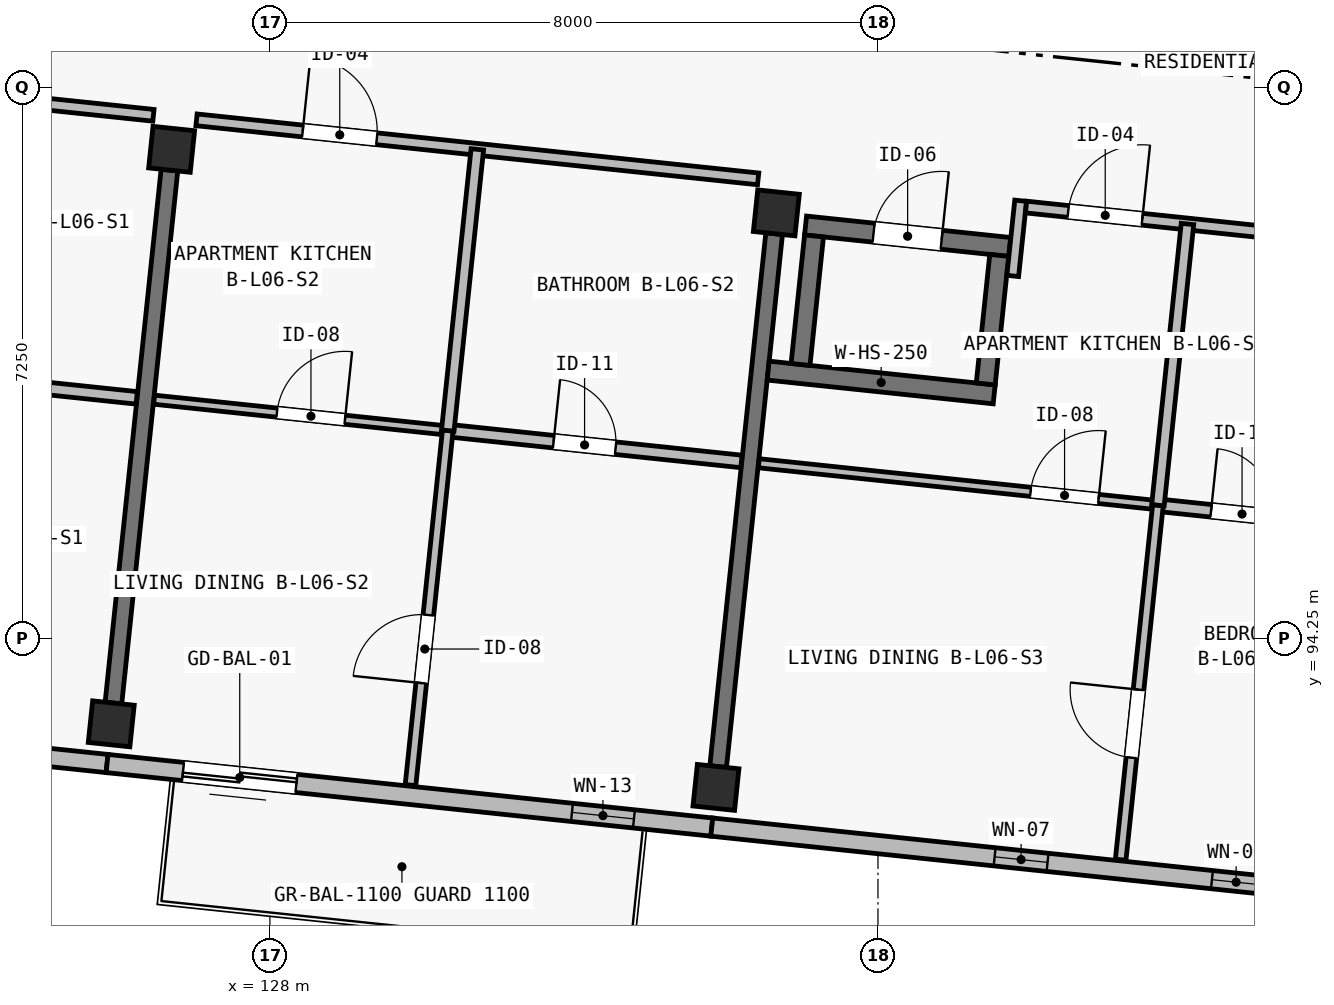
"""IFC4 building model, lengths in metres.
Left out: names, types, materials, properties, quantities, classifications, styles, units other than length and angle.
Written with IfcOpenShell. Run it as: python <this file> out.ifc"""

import sys

from ifc_helpers import new_model, si_unit, direction, frame, frame_2d, origin, origin_2d, place, context, subcontext, project, spatial, rectangle, extrude, element, fill, save


model = new_model("IFC4")
c1 = context("Model", 3, precision=1e-05, world=origin(), true_north=direction((0.0, 1.0)))
c2 = subcontext(c1, "Body", "Model", "MODEL_VIEW")
j1 = project(units=[si_unit("LENGTHUNIT", "METRE"), si_unit("PLANEANGLEUNIT", "RADIAN")], contexts=[c1])
p1 = place(None, origin())
s1 = spatial("IfcSite", under=j1, at=p1, CompositionType="ELEMENT")
p2 = place(p1, origin())
s2 = spatial("IfcBuilding", under=s1, at=p2, CompositionType="ELEMENT")
p3 = place(p2, frame((0.0, 0.0, 21.4)))
s3 = spatial("IfcBuildingStorey", under=s2, at=p3, CompositionType="ELEMENT", Elevation=21.4)
for number, where, z_axis, x_axis in (
    (1, (125.912, 93.127, 0.0), (0.0, 0.0, 1.0), (0.995, -0.105, 0.0)),
    (2, (126.707, 100.686, 0.0), (0.0, 0.0, 1.0), (0.995, -0.105, 0.0)),
    (3, (133.868, 92.291, 0.0), (0.0, 0.0, 1.0), (0.995, -0.105, 0.0)),
    (4, (134.663, 99.85, 0.0), (0.0, 0.0, 1.0), (0.995, -0.105, 0.0)),
):
    element("IfcColumn", number, at=place(p3, frame(where, z_axis=z_axis, x_axis=x_axis)), inside=s3, PredefinedType="COLUMN", context=c2, shape_type="SweptSolid", body=[
        extrude(rectangle(XDim=0.55, YDim=0.55, at=origin_2d()), origin(), (0.0, 0.0, 1.0), 3.25),
    ])
p4 = place(p3, frame((125.941, 93.401, 0.0), z_axis=(0.0, 0.0, 1.0), x_axis=(0.104515329964, 0.994523275646, 0.0)))
e5 = element("IfcWall", 5, at=p4, inside=s3, PredefinedType="SHEAR", context=c2, shape_type="SweptSolid", body=[
    extrude(rectangle(XDim=7.05, YDim=0.22, at=frame_2d((3.525, 0.0))), origin(), (0.0, 0.0, 1.0), 2.5),
])
p5 = place(p3, frame((133.897, 92.565, 0.0), z_axis=(0.0, 0.0, 1.0), x_axis=(0.104545981508, 0.994520053971, 0.0)))
e6 = element("IfcWall", 6, at=p5, inside=s3, PredefinedType="SHEAR", context=c2, shape_type="SweptSolid", body=[
    extrude(rectangle(XDim=7.05, YDim=0.22, at=frame_2d((3.525, 0.0))), origin(), (0.0, 0.0, 1.0), 2.5),
])
p6 = place(p3, frame((134.555, 97.775, 0.0), z_axis=(0.0, 0.0, 1.0), x_axis=(0.994514844427, -0.104595526741, 0.0)))
e7 = element("IfcWall", 7, at=p6, inside=s3, PredefinedType="SHEAR", context=c2, shape_type="SweptSolid", body=[
    extrude(rectangle(XDim=2.99, YDim=0.25, at=frame_2d((1.495, 0.0))), origin(), (0.0, 0.0, 1.0), 3.25),
])
p7 = place(p3, frame((135.048, 99.684, 0.0), z_axis=(0.0, 0.0, 1.0), x_axis=(0.994522285292, -0.104524753323, 0.0)))
e8 = element("IfcWall", 8, at=p7, inside=s3, PredefinedType="SHEAR", context=c2, shape_type="SweptSolid", body=[
    extrude(rectangle(XDim=2.7, YDim=0.25, at=frame_2d((1.35, 0.0))), origin(), (0.0, 0.0, 1.0), 3.25),
])
p8 = place(p7, frame((0.9, 0.0, 0.0)))
e9 = element("IfcOpeningElement", 9, at=p8, cuts=e8, PredefinedType="OPENING", context=c2, shape_type="SweptSolid", body=[
    extrude(rectangle(XDim=0.9, YDim=2.05, at=frame_2d((0.45, 1.025))), frame((0.0, 0.14, 0.0), z_axis=(0.0, -1.0, 0.0), x_axis=(1.0, 0.0, 0.0)), (0.0, 0.0, 1.0), 0.28),
])
for number, where, z_axis, x_axis in (
    (10, (134.981, 97.855, 0.0), (0.0, 0.0, 1.0), (0.105, 0.995, 0.0)),
    (11, (137.418, 97.599, 0.0), (0.0, 0.0, 1.0), (0.105, 0.995, 0.0)),
):
    element("IfcWall", number, at=place(p3, frame(where, z_axis=z_axis, x_axis=x_axis)), inside=s3, PredefinedType="SHEAR", context=c2, shape_type="SweptSolid", body=[
        extrude(rectangle(XDim=1.7, YDim=0.25, at=frame_2d((0.85, 0.0))), origin(), (0.0, 0.0, 1.0), 3.25),
    ])
p9 = place(p3, frame((125.857, 92.605, 0.0), z_axis=(0.0, 0.0, 1.0), x_axis=(-0.994522329422, 0.104524333444, 0.0)))
e12 = element("IfcWall", 12, at=p9, inside=s3, PredefinedType="SOLIDWALL", context=c2, shape_type="SweptSolid", body=[
    extrude(rectangle(XDim=8.0, YDim=0.24, at=frame_2d((4.0, 0.0))), origin(), (0.0, 0.0, 1.0), 3.0),
])
p10 = place(p9, frame((1.919, 0.0, 0.48)))
e13 = element("IfcOpeningElement", 13, at=p10, cuts=e12, PredefinedType="OPENING", context=c2, shape_type="SweptSolid", body=[
    extrude(rectangle(XDim=0.74, YDim=2.26, at=frame_2d((0.37, 1.13))), frame((0.0, 0.135, 0.0), z_axis=(0.0, -1.0, 0.0), x_axis=(1.0, 0.0, 0.0)), (0.0, 0.0, 1.0), 0.27),
])
p11 = place(p9, frame((5.33, 0.0, 0.48)))
e14 = element("IfcOpeningElement", 14, at=p11, cuts=e12, PredefinedType="OPENING", context=c2, shape_type="SweptSolid", body=[
    extrude(rectangle(XDim=0.8, YDim=2.3, at=frame_2d((0.4, 1.15))), frame((0.0, 0.135, 0.0), z_axis=(0.0, -1.0, 0.0), x_axis=(1.0, 0.0, 0.0)), (0.0, 0.0, 1.0), 0.27),
])
p12 = place(p3, frame((133.814, 91.769, 0.0), z_axis=(0.0, 0.0, 1.0), x_axis=(-0.994522662826, 0.104521161134, 0.0)))
e15 = element("IfcWall", 15, at=p12, inside=s3, PredefinedType="SOLIDWALL", context=c2, shape_type="SweptSolid", body=[
    extrude(rectangle(XDim=8.0, YDim=0.24, at=frame_2d((4.0, 0.0))), origin(), (0.0, 0.0, 1.0), 3.0),
])
p13 = place(p12, frame((5.495, 0.0, 0.0)))
e16 = element("IfcOpeningElement", 16, at=p13, cuts=e15, PredefinedType="OPENING", context=c2, shape_type="SweptSolid", body=[
    extrude(rectangle(XDim=1.5, YDim=2.12, at=frame_2d((0.75, 1.06))), frame((0.0, 0.135, 0.0), z_axis=(0.0, -1.0, 0.0), x_axis=(1.0, 0.0, 0.0)), (0.0, 0.0, 1.0), 0.27),
])
p14 = place(p12, frame((1.03, 0.0, 0.5)))
e17 = element("IfcOpeningElement", 17, at=p14, cuts=e15, PredefinedType="OPENING", context=c2, shape_type="SweptSolid", body=[
    extrude(rectangle(XDim=0.82, YDim=2.18, at=frame_2d((0.41, 1.09))), frame((0.0, 0.135, 0.0), z_axis=(0.0, -1.0, 0.0), x_axis=(1.0, 0.0, 0.0)), (0.0, 0.0, 1.0), 0.27),
])
p15 = place(p3, frame((141.77, 90.933, 0.0), z_axis=(0.0, 0.0, 1.0), x_axis=(-0.994519156568, 0.104554517933, 0.0)))
e18 = element("IfcWall", 18, at=p15, inside=s3, PredefinedType="SOLIDWALL", context=c2, shape_type="SweptSolid", body=[
    extrude(rectangle(XDim=8.0, YDim=0.24, at=frame_2d((4.0, 0.0))), origin(), (0.0, 0.0, 1.0), 3.0),
])
p16 = place(p15, frame((0.743, 0.0, 0.42)))
e19 = element("IfcOpeningElement", 19, at=p16, cuts=e18, PredefinedType="OPENING", context=c2, shape_type="SweptSolid", body=[
    extrude(rectangle(XDim=0.64, YDim=2.18, at=frame_2d((0.32, 1.09))), frame((0.0, 0.135, 0.0), z_axis=(0.0, -1.0, 0.0), x_axis=(1.0, 0.0, 0.0)), (0.0, 0.0, 1.0), 0.27),
])
p17 = place(p15, frame((3.558, 0.0, 0.42)))
e20 = element("IfcOpeningElement", 20, at=p17, cuts=e18, PredefinedType="OPENING", context=c2, shape_type="SweptSolid", body=[
    extrude(rectangle(XDim=0.7, YDim=2.36, at=frame_2d((0.35, 1.18))), frame((0.0, 0.135, 0.0), z_axis=(0.0, -1.0, 0.0), x_axis=(1.0, 0.0, 0.0)), (0.0, 0.0, 1.0), 0.27),
])
p18 = place(p3, frame((119.078, 101.91, 0.0), z_axis=(0.0, 0.0, 1.0), x_axis=(0.99451912784, -0.104554791185, 0.0)))
e21 = element("IfcWall", 21, at=p18, inside=s3, PredefinedType="PARTITIONING", context=c2, shape_type="SweptSolid", body=[
    extrude(rectangle(XDim=7.43, YDim=0.155, at=frame_2d((3.715, 0.0))), origin(), (0.0, 0.0, 1.0), 2.97),
])
p19 = place(p18, frame((1.405, 0.0, 0.0)))
e22 = element("IfcOpeningElement", 22, at=p19, cuts=e21, PredefinedType="OPENING", context=c2, shape_type="SweptSolid", body=[
    extrude(rectangle(XDim=1.02, YDim=2.2, at=frame_2d((0.51, 1.1))), frame((0.0, 0.093, 0.0), z_axis=(0.0, -1.0, 0.0), x_axis=(1.0, 0.0, 0.0)), (0.0, 0.0, 1.0), 0.185),
])
p20 = place(p3, frame((122.384, 97.822, 0.0), z_axis=(0.0, 0.0, 1.0), x_axis=(0.994524375082, -0.104504867671, 0.0)))
e23 = element("IfcWall", 23, at=p20, inside=s3, PredefinedType="PLUMBINGWALL", context=c2, shape_type="SweptSolid", body=[
    extrude(rectangle(XDim=3.885, YDim=0.165, at=frame_2d((1.942, 0.0))), origin(), (0.0, 0.0, 1.0), 2.97),
])
p21 = place(p20, frame((1.4, 0.0, 0.0)))
e24 = element("IfcOpeningElement", 24, at=p21, cuts=e23, PredefinedType="OPENING", context=c2, shape_type="SweptSolid", body=[
    extrude(rectangle(XDim=0.82, YDim=2.08, at=frame_2d((0.41, 1.04))), frame((0.0, 0.097, 0.0), z_axis=(0.0, -1.0, 0.0), x_axis=(1.0, 0.0, 0.0)), (0.0, 0.0, 1.0), 0.195),
])
p22 = place(p3, frame((127.034, 101.074, 0.0), z_axis=(0.0, 0.0, 1.0), x_axis=(0.994522184982, -0.104525707739, 0.0)))
e25 = element("IfcWall", 25, at=p22, inside=s3, PredefinedType="PARTITIONING", context=c2, shape_type="SweptSolid", body=[
    extrude(rectangle(XDim=7.43, YDim=0.155, at=frame_2d((3.715, 0.0))), origin(), (0.0, 0.0, 1.0), 2.97),
])
p23 = place(p22, frame((1.405, 0.0, 0.0)))
e26 = element("IfcOpeningElement", 26, at=p23, cuts=e25, PredefinedType="OPENING", context=c2, shape_type="SweptSolid", body=[
    extrude(rectangle(XDim=0.98, YDim=2.15, at=frame_2d((0.49, 1.075))), frame((0.0, 0.093, 0.0), z_axis=(0.0, -1.0, 0.0), x_axis=(1.0, 0.0, 0.0)), (0.0, 0.0, 1.0), 0.185),
])
p24 = place(p3, frame((126.476, 97.392, 0.0), z_axis=(0.0, 0.0, 1.0), x_axis=(0.994517841934, -0.104567021925, 0.0)))
e27 = element("IfcWall", 27, at=p24, inside=s3, PredefinedType="PARTITIONING", context=c2, shape_type="SweptSolid", body=[
    extrude(rectangle(XDim=3.885, YDim=0.12, at=frame_2d((1.942, 0.0))), origin(), (0.0, 0.0, 1.0), 2.97),
])
p25 = place(p24, frame((1.625, 0.0, 0.0)))
e28 = element("IfcOpeningElement", 28, at=p25, cuts=e27, PredefinedType="OPENING", context=c2, shape_type="SweptSolid", body=[
    extrude(rectangle(XDim=0.9, YDim=2.1, at=frame_2d((0.45, 1.05))), frame((0.0, 0.075, 0.0), z_axis=(0.0, -1.0, 0.0), x_axis=(1.0, 0.0, 0.0)), (0.0, 0.0, 1.0), 0.15),
])
p26 = place(p3, frame((130.34, 96.986, 0.0), z_axis=(0.0, 0.0, 1.0), x_axis=(0.994524375082, -0.104504867671, 0.0)))
e29 = element("IfcWall", 29, at=p26, inside=s3, PredefinedType="PLUMBINGWALL", context=c2, shape_type="SweptSolid", body=[
    extrude(rectangle(XDim=3.885, YDim=0.165, at=frame_2d((1.942, 0.0))), origin(), (0.0, 0.0, 1.0), 2.97),
])
p27 = place(p26, frame((1.4, 0.0, 0.0)))
e30 = element("IfcOpeningElement", 30, at=p27, cuts=e29, PredefinedType="OPENING", context=c2, shape_type="SweptSolid", body=[
    extrude(rectangle(XDim=0.82, YDim=2.08, at=frame_2d((0.41, 1.04))), frame((0.0, 0.097, 0.0), z_axis=(0.0, -1.0, 0.0), x_axis=(1.0, 0.0, 0.0)), (0.0, 0.0, 1.0), 0.195),
])
p28 = place(p3, frame((129.85, 92.322, 0.0), z_axis=(0.0, 0.0, 1.0), x_axis=(0.104527618124, 0.994521984196, 0.0)))
e31 = element("IfcWall", 31, at=p28, inside=s3, PredefinedType="PARTITIONING", context=c2, shape_type="SweptSolid", body=[
    extrude(rectangle(XDim=4.69, YDim=0.14, at=frame_2d((2.345, 0.0))), origin(), (0.0, 0.0, 1.0), 2.97),
])
p29 = place(p28, frame((1.35, 0.0, 0.0)))
e32 = element("IfcOpeningElement", 32, at=p29, cuts=e31, PredefinedType="OPENING", context=c2, shape_type="SweptSolid", body=[
    extrude(rectangle(XDim=0.9, YDim=2.1, at=frame_2d((0.45, 1.05))), frame((0.0, 0.085, 0.0), z_axis=(0.0, -1.0, 0.0), x_axis=(1.0, 0.0, 0.0)), (0.0, 0.0, 1.0), 0.17),
])
p30 = place(p3, frame((130.34, 96.986, 0.0), z_axis=(0.0, 0.0, 1.0), x_axis=(0.104544718065, 0.994520186786, 0.0)))
e33 = element("IfcWall", 33, at=p30, inside=s3, PredefinedType="PLUMBINGWALL", context=c2, shape_type="SweptSolid", body=[
    extrude(rectangle(XDim=3.72, YDim=0.165, at=frame_2d((1.86, 0.0))), origin(), (0.0, 0.0, 1.0), 2.97),
])
p31 = place(p3, frame((137.773, 99.02, 0.0), z_axis=(0.0, 0.0, 1.0), x_axis=(0.104531505358, 0.994521575627, 0.0)))
e34 = element("IfcWall", 34, at=p31, inside=s3, PredefinedType="PARTITIONING", context=c2, shape_type="SweptSolid", body=[
    extrude(rectangle(XDim=0.995, YDim=0.155, at=frame_2d((0.498, 0.0))), origin(), (0.0, 0.0, 1.0), 2.97),
])
p32 = place(p3, frame((137.949, 99.927, 0.0), z_axis=(0.0, 0.0, 1.0), x_axis=(0.994524354209, -0.104505066315, 0.0)))
e35 = element("IfcWall", 35, at=p32, inside=s3, PredefinedType="PARTITIONING", context=c2, shape_type="SweptSolid", body=[
    extrude(rectangle(XDim=4.455, YDim=0.155, at=frame_2d((2.228, 0.0))), origin(), (0.0, 0.0, 1.0), 2.97),
])
p33 = place(p32, frame((0.557, 0.0, 0.0)))
e36 = element("IfcOpeningElement", 36, at=p33, cuts=e35, PredefinedType="OPENING", context=c2, shape_type="SweptSolid", body=[
    extrude(rectangle(XDim=0.98, YDim=2.15, at=frame_2d((0.49, 1.075))), frame((0.0, 0.093, 0.0), z_axis=(0.0, -1.0, 0.0), x_axis=(1.0, 0.0, 0.0)), (0.0, 0.0, 1.0), 0.185),
])
p34 = place(p3, frame((134.432, 96.556, 0.0), z_axis=(0.0, 0.0, 1.0), x_axis=(0.994524692105, -0.104501850668, 0.0)))
e37 = element("IfcWall", 37, at=p34, inside=s3, PredefinedType="PARTITIONING", context=c2, shape_type="SweptSolid", body=[
    extrude(rectangle(XDim=5.28, YDim=0.12, at=frame_2d((2.64, 0.0))), origin(), (0.0, 0.0, 1.0), 2.97),
])
p35 = place(p34, frame((3.595, 0.0, 0.0)))
e38 = element("IfcOpeningElement", 38, at=p35, cuts=e37, PredefinedType="OPENING", context=c2, shape_type="SweptSolid", body=[
    extrude(rectangle(XDim=0.9, YDim=2.1, at=frame_2d((0.45, 1.05))), frame((0.0, 0.075, 0.0), z_axis=(0.0, -1.0, 0.0), x_axis=(1.0, 0.0, 0.0)), (0.0, 0.0, 1.0), 0.15),
])
p36 = place(p3, frame((139.683, 96.004, 0.0), z_axis=(0.0, 0.0, 1.0), x_axis=(0.994523702879, -0.104511264518, 0.0)))
e39 = element("IfcWall", 39, at=p36, inside=s3, PredefinedType="PLUMBINGWALL", context=c2, shape_type="SweptSolid", body=[
    extrude(rectangle(XDim=2.49, YDim=0.165, at=frame_2d((1.245, 0.0))), origin(), (0.0, 0.0, 1.0), 2.97),
])
p37 = place(p36, frame((0.703, 0.0, 0.0)))
e40 = element("IfcOpeningElement", 40, at=p37, cuts=e39, PredefinedType="OPENING", context=c2, shape_type="SweptSolid", body=[
    extrude(rectangle(XDim=0.82, YDim=2.08, at=frame_2d((0.41, 1.04))), frame((0.0, 0.097, 0.0), z_axis=(0.0, -1.0, 0.0), x_axis=(1.0, 0.0, 0.0)), (0.0, 0.0, 1.0), 0.195),
])
p38 = place(p3, frame((139.193, 91.34, 0.0), z_axis=(0.0, 0.0, 1.0), x_axis=(0.104527618124, 0.994521984196, 0.0)))
e41 = element("IfcWall", 41, at=p38, inside=s3, PredefinedType="PARTITIONING", context=c2, shape_type="SweptSolid", body=[
    extrude(rectangle(XDim=4.69, YDim=0.14, at=frame_2d((2.345, 0.0))), origin(), (0.0, 0.0, 1.0), 2.97),
])
p39 = place(p38, frame((1.35, 0.0, 0.0)))
e42 = element("IfcOpeningElement", 42, at=p39, cuts=e41, PredefinedType="OPENING", context=c2, shape_type="SweptSolid", body=[
    extrude(rectangle(XDim=0.9, YDim=2.1, at=frame_2d((0.45, 1.05))), frame((0.0, 0.085, 0.0), z_axis=(0.0, -1.0, 0.0), x_axis=(1.0, 0.0, 0.0)), (0.0, 0.0, 1.0), 0.17),
])
p40 = place(p3, frame((139.683, 96.004, 0.0), z_axis=(0.0, 0.0, 1.0), x_axis=(0.104551541926, 0.994519469433, 0.0)))
e43 = element("IfcWall", 43, at=p40, inside=s3, PredefinedType="PLUMBINGWALL", context=c2, shape_type="SweptSolid", body=[
    extrude(rectangle(XDim=3.72, YDim=0.165, at=frame_2d((1.86, 0.0))), origin(), (0.0, 0.0, 1.0), 2.97),
])
p41 = place(p13, origin())
e44 = element("IfcDoor", 44, at=p41, inside=s3, OperationType="SLIDING_TO_RIGHT", PredefinedType="DOOR", context=c2, shape_type="SweptSolid", body=[
    extrude(rectangle(XDim=1.5, YDim=2.12, at=frame_2d((0.75, 1.06))), frame((0.0, 0.025, 0.0), z_axis=(0.0, -1.0, 0.0), x_axis=(1.0, 0.0, 0.0)), (0.0, 0.0, 1.0), 0.05),
])
fill(e16, e44)
p42 = place(p14, origin())
e45 = element("IfcWindow", 45, at=p42, inside=s3, PartitioningType="SINGLE_PANEL", PredefinedType="WINDOW", context=c2, shape_type="SweptSolid", body=[
    extrude(rectangle(XDim=0.82, YDim=2.18, at=frame_2d((0.41, 1.09))), frame((0.0, 0.03, 0.0), z_axis=(0.0, -1.0, 0.0), x_axis=(1.0, 0.0, 0.0)), (0.0, 0.0, 1.0), 0.06),
])
fill(e17, e45)
p43 = place(p16, origin())
e46 = element("IfcWindow", 46, at=p43, inside=s3, PartitioningType="SINGLE_PANEL", PredefinedType="WINDOW", context=c2, shape_type="SweptSolid", body=[
    extrude(rectangle(XDim=0.64, YDim=2.18, at=frame_2d((0.32, 1.09))), frame((0.0, 0.03, 0.0), z_axis=(0.0, -1.0, 0.0), x_axis=(1.0, 0.0, 0.0)), (0.0, 0.0, 1.0), 0.06),
])
fill(e19, e46)
p44 = place(p17, origin())
e47 = element("IfcWindow", 47, at=p44, inside=s3, PartitioningType="SINGLE_PANEL", PredefinedType="WINDOW", context=c2, shape_type="SweptSolid", body=[
    extrude(rectangle(XDim=0.7, YDim=2.36, at=frame_2d((0.35, 1.18))), frame((0.0, 0.03, 0.0), z_axis=(0.0, -1.0, 0.0), x_axis=(1.0, 0.0, 0.0)), (0.0, 0.0, 1.0), 0.06),
])
fill(e20, e47)
p45 = place(p23, origin())
e48 = element("IfcDoor", 48, at=p45, inside=s3, OperationType="SINGLE_SWING_LEFT", PredefinedType="DOOR", context=c2, shape_type="SweptSolid", body=[
    extrude(rectangle(XDim=0.98, YDim=2.15, at=frame_2d((0.49, 1.075))), frame((0.0, 0.025, 0.0), z_axis=(0.0, -1.0, 0.0), x_axis=(1.0, 0.0, 0.0)), (0.0, 0.0, 1.0), 0.05),
])
fill(e26, e48)
p46 = place(p25, origin())
e49 = element("IfcDoor", 49, at=p46, inside=s3, OperationType="SINGLE_SWING_RIGHT", PredefinedType="DOOR", context=c2, shape_type="SweptSolid", body=[
    extrude(rectangle(XDim=0.9, YDim=2.1, at=frame_2d((0.45, 1.05))), frame((0.0, 0.025, 0.0), z_axis=(0.0, -1.0, 0.0), x_axis=(1.0, 0.0, 0.0)), (0.0, 0.0, 1.0), 0.05),
])
fill(e28, e49)
p47 = place(p27, origin())
e50 = element("IfcDoor", 50, at=p47, inside=s3, OperationType="SINGLE_SWING_LEFT", PredefinedType="DOOR", context=c2, shape_type="SweptSolid", body=[
    extrude(rectangle(XDim=0.82, YDim=2.08, at=frame_2d((0.41, 1.04))), frame((0.0, 0.025, 0.0), z_axis=(0.0, -1.0, 0.0), x_axis=(1.0, 0.0, 0.0)), (0.0, 0.0, 1.0), 0.05),
])
fill(e30, e50)
p48 = place(p29, origin())
e51 = element("IfcDoor", 51, at=p48, inside=s3, OperationType="SINGLE_SWING_LEFT", PredefinedType="DOOR", context=c2, shape_type="SweptSolid", body=[
    extrude(rectangle(XDim=0.9, YDim=2.1, at=frame_2d((0.45, 1.05))), frame((0.0, 0.025, 0.0), z_axis=(0.0, -1.0, 0.0), x_axis=(1.0, 0.0, 0.0)), (0.0, 0.0, 1.0), 0.05),
])
fill(e32, e51)
p49 = place(p33, origin())
e52 = element("IfcDoor", 52, at=p49, inside=s3, OperationType="SINGLE_SWING_RIGHT", PredefinedType="DOOR", context=c2, shape_type="SweptSolid", body=[
    extrude(rectangle(XDim=0.98, YDim=2.15, at=frame_2d((0.49, 1.075))), frame((0.0, 0.025, 0.0), z_axis=(0.0, -1.0, 0.0), x_axis=(1.0, 0.0, 0.0)), (0.0, 0.0, 1.0), 0.05),
])
fill(e36, e52)
p50 = place(p35, origin())
e53 = element("IfcDoor", 53, at=p50, inside=s3, OperationType="SINGLE_SWING_RIGHT", PredefinedType="DOOR", context=c2, shape_type="SweptSolid", body=[
    extrude(rectangle(XDim=0.9, YDim=2.1, at=frame_2d((0.45, 1.05))), frame((0.0, 0.025, 0.0), z_axis=(0.0, -1.0, 0.0), x_axis=(1.0, 0.0, 0.0)), (0.0, 0.0, 1.0), 0.05),
])
fill(e38, e53)
p51 = place(p37, origin())
e54 = element("IfcDoor", 54, at=p51, inside=s3, OperationType="SINGLE_SWING_LEFT", PredefinedType="DOOR", context=c2, shape_type="SweptSolid", body=[
    extrude(rectangle(XDim=0.82, YDim=2.08, at=frame_2d((0.41, 1.04))), frame((0.0, 0.025, 0.0), z_axis=(0.0, -1.0, 0.0), x_axis=(1.0, 0.0, 0.0)), (0.0, 0.0, 1.0), 0.05),
])
fill(e40, e54)
p52 = place(p39, origin())
e55 = element("IfcDoor", 55, at=p52, inside=s3, OperationType="SINGLE_SWING_RIGHT", PredefinedType="DOOR", context=c2, shape_type="SweptSolid", body=[
    extrude(rectangle(XDim=0.9, YDim=2.1, at=frame_2d((0.45, 1.05))), frame((0.0, 0.025, 0.0), z_axis=(0.0, -1.0, 0.0), x_axis=(1.0, 0.0, 0.0)), (0.0, 0.0, 1.0), 0.05),
])
fill(e42, e55)
p53 = place(p8, origin())
e56 = element("IfcDoor", 56, at=p53, inside=s3, OperationType="SINGLE_SWING_RIGHT", PredefinedType="DOOR", context=c2, shape_type="SweptSolid", body=[
    extrude(rectangle(XDim=0.9, YDim=2.05, at=frame_2d((0.45, 1.025))), frame((0.0, 0.025, 0.0), z_axis=(0.0, -1.0, 0.0), x_axis=(1.0, 0.0, 0.0)), (0.0, 0.0, 1.0), 0.05),
])
fill(e9, e56)
save(model, sys.argv[1])
